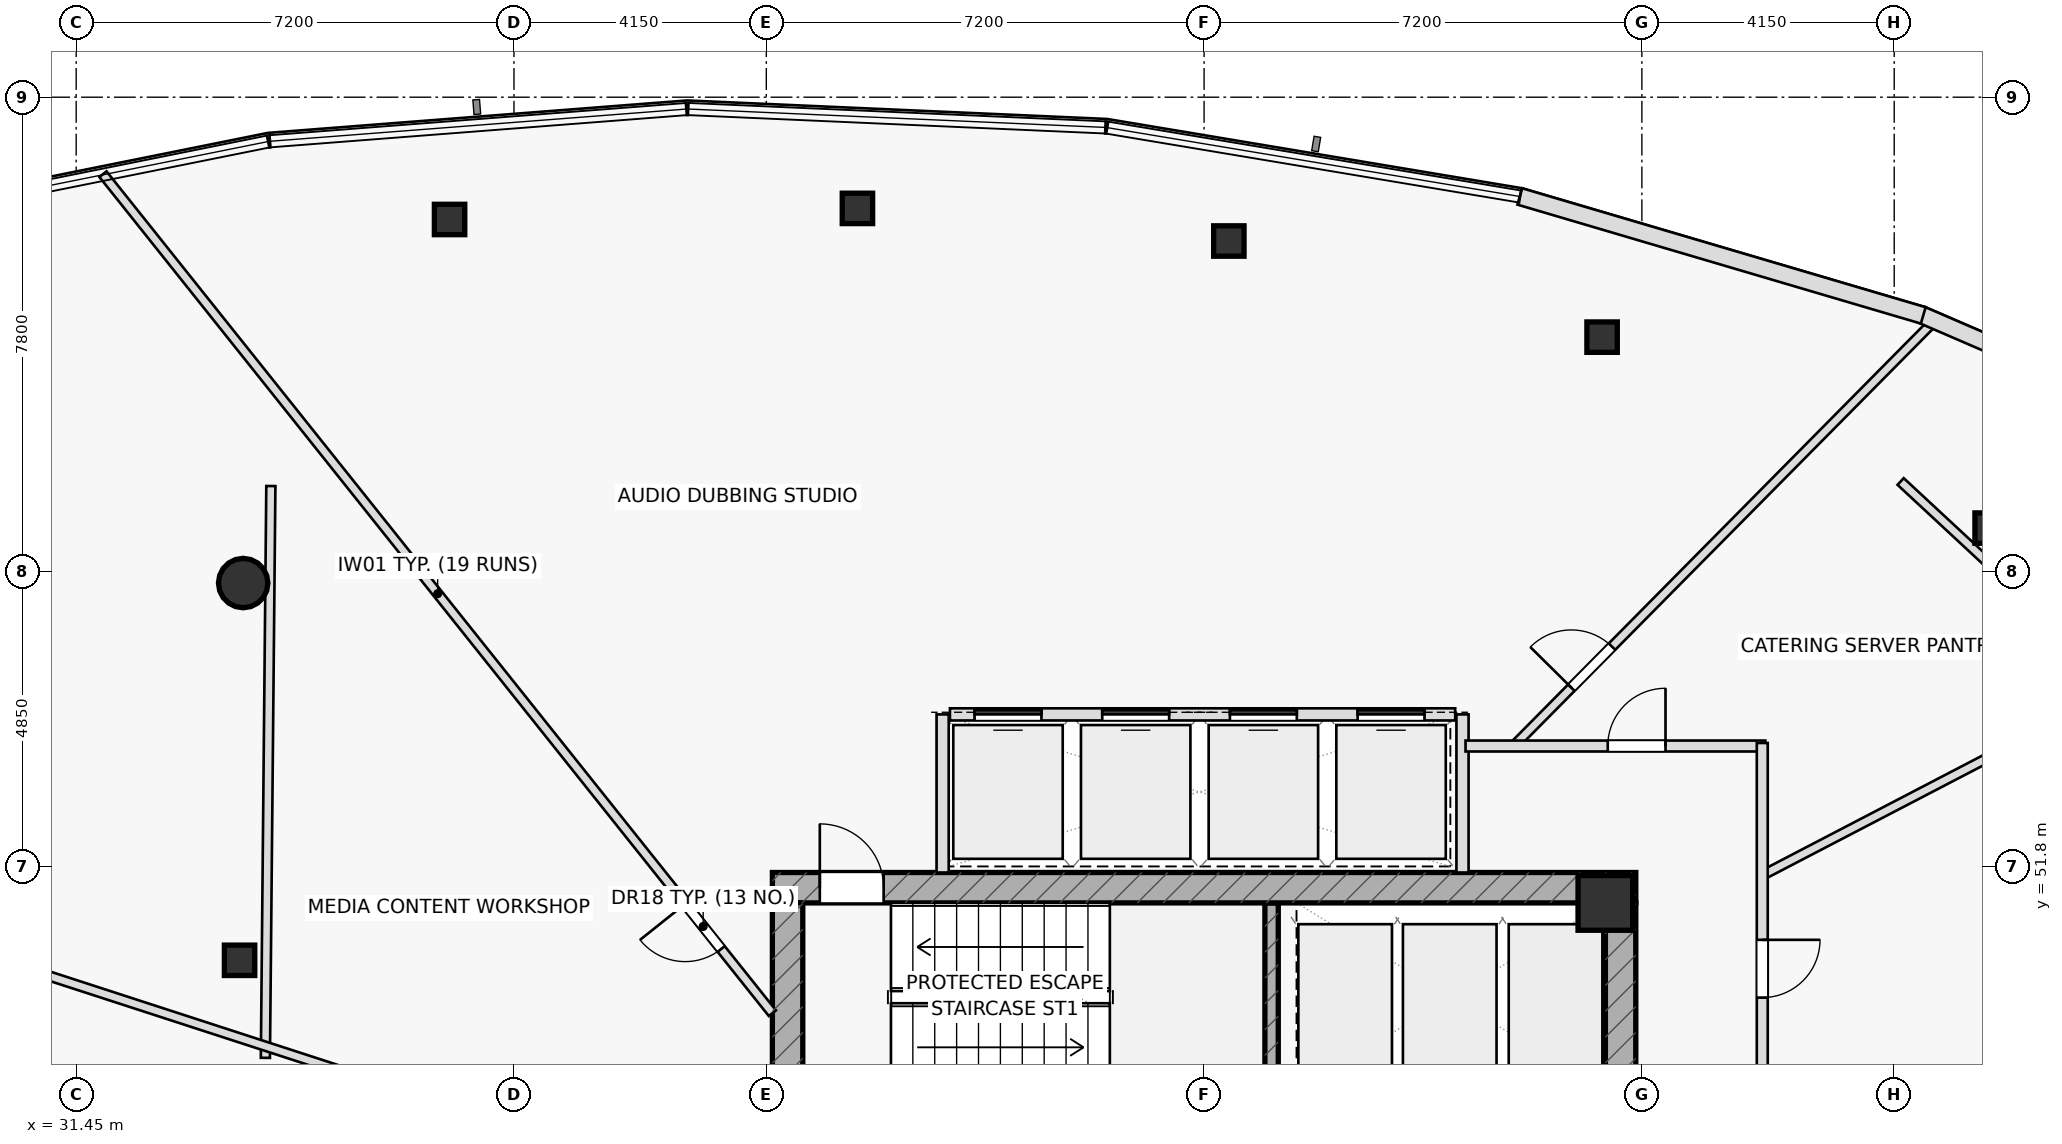
"""IFC4 building model, lengths in metres.
Left out: names, types, materials, properties, quantities, classifications, styles, units other than length and angle.
Written with IfcOpenShell. Run it as: python <this file> out.ifc"""

import sys

from ifc_helpers import new_model, si_unit, direction, frame, frame_2d, origin, origin_2d, place, context, subcontext, project, spatial, rectangle, hollow_rectangle, hollow_circle, extrude, element, fill, save


model = new_model("IFC4")
c1 = context("Model", 3, precision=1e-05, world=origin(), true_north=direction((0.0, 1.0)))
c2 = subcontext(c1, "Body", "Model", "MODEL_VIEW")
j1 = project(units=[si_unit("LENGTHUNIT", "METRE"), si_unit("PLANEANGLEUNIT", "RADIAN")], contexts=[c1])
p1 = place(None, origin())
s1 = spatial("IfcSite", under=j1, at=p1, CompositionType="ELEMENT")
p2 = place(p1, origin())
s2 = spatial("IfcBuilding", under=s1, at=p2, CompositionType="ELEMENT")
p3 = place(p2, frame((0.0, 0.0, 269.55)))
s3 = spatial("IfcBuildingStorey", under=s2, at=p3, CompositionType="ELEMENT", Elevation=269.55)
p4 = place(p3, frame((51.11, 48.1, 0.0), z_axis=(0.0, 0.0, 1.0), x_axis=(0.0, 1.0, 0.0)))
e1 = element("IfcWall", 1, at=p4, inside=s3, PredefinedType="SHEAR", context=c2, shape_type="SweptSolid", body=[
    extrude(rectangle(XDim=3.1, YDim=0.22, at=frame_2d((1.55, 0.0))), origin(), (0.0, 0.0, 1.0), 3.5),
])
p5 = place(p3, frame((42.9, 51.45, 0.0), z_axis=(0.0, 0.0, 1.0), x_axis=(1.0, 0.0, 0.0)))
e2 = element("IfcWall", 2, at=p5, inside=s3, PredefinedType="SHEAR", context=c2, shape_type="SweptSolid", body=[
    extrude(rectangle(XDim=14.2, YDim=0.5, at=frame_2d((7.1, 0.0))), origin(), (0.0, 0.0, 1.0), 3.5),
])
p6 = place(p5, frame((0.78, 0.0, 0.0)))
e3 = element("IfcOpeningElement", 3, at=p6, cuts=e2, PredefinedType="OPENING", context=c2, shape_type="SweptSolid", body=[
    extrude(rectangle(XDim=1.05, YDim=2.2, at=frame_2d((0.525, 1.1))), frame((0.0, 0.26, 0.0), z_axis=(0.0, -1.0, 0.0), x_axis=(1.0, 0.0, 0.0)), (0.0, 0.0, 1.0), 0.52),
])
p7 = place(p3, frame((43.15, 38.8, 0.0), z_axis=(0.0, 0.0, 1.0), x_axis=(0.0, 1.0, 0.0)))
e4 = element("IfcWall", 4, at=p7, inside=s3, PredefinedType="SHEAR", context=c2, shape_type="SweptSolid", body=[
    extrude(rectangle(XDim=12.4, YDim=0.5, at=frame_2d((6.2, 0.0))), origin(), (0.0, 0.0, 1.0), 3.5),
])
p8 = place(p3, frame((56.85, 38.8, 0.0), z_axis=(0.0, 0.0, 1.0), x_axis=(0.0, 1.0, 0.0)))
e5 = element("IfcWall", 5, at=p8, inside=s3, PredefinedType="SHEAR", context=c2, shape_type="SweptSolid", body=[
    extrude(rectangle(XDim=12.4, YDim=0.5, at=frame_2d((6.2, 0.0))), origin(), (0.0, 0.0, 1.0), 3.5),
])
p9 = place(p8, frame((3.85, 0.0, 0.0)))
e6 = element("IfcOpeningElement", 6, at=p9, cuts=e5, PredefinedType="OPENING", context=c2, shape_type="SweptSolid", body=[
    extrude(rectangle(XDim=1.5, YDim=2.2, at=frame_2d((0.75, 1.1))), frame((0.0, 0.26, 0.0), z_axis=(0.0, -1.0, 0.0), x_axis=(1.0, 0.0, 0.0)), (0.0, 0.0, 1.0), 0.52),
])
p10 = place(p3, frame((56.6, 51.2, 0.0), z_axis=(0.0, 0.0, 1.0), x_axis=(1.0, 0.0, 0.0)))
e7 = element("IfcColumn", 7, at=p10, inside=s3, PredefinedType="COLUMN", context=c2, shape_type="SweptSolid", body=[
    extrude(rectangle(XDim=0.9, YDim=0.9, at=origin_2d()), origin(), (0.0, 0.0, 1.0), 3.5),
])
p11 = place(p3, frame((34.196, 56.46, 0.0), z_axis=(0.0, 0.0, 1.0), x_axis=(1.0, 0.0, 0.0)))
e8 = element("IfcColumn", 8, at=p11, inside=s3, PredefinedType="COLUMN", context=c2, shape_type="SweptSolid", body=[
    extrude(hollow_circle(Radius=0.406, WallThickness=0.036, at=origin_2d()), origin(), (0.0, 0.0, 1.0), 3.5),
])
for number, where, z_axis, x_axis in (
    (9, (34.137, 50.256, 0.0), (0.0, 0.0, 1.0), (1.0, 0.0, 0.0)),
    (10, (62.927, 57.364, 0.0), (0.0, 0.0, 1.0), (1.0, 0.0, 0.0)),
    (11, (56.546, 60.504, 0.0), (0.0, 0.0, 1.0), (1.0, 0.0, 0.0)),
    (12, (50.407, 62.085, 0.0), (0.0, 0.0, 1.0), (1.0, 0.0, 0.0)),
    (13, (44.299, 62.621, 0.0), (0.0, 0.0, 1.0), (1.0, 0.0, 0.0)),
    (14, (37.591, 62.439, 0.0), (0.0, 0.0, 1.0), (1.0, 0.0, 0.0)),
):
    element("IfcColumn", number, at=place(p3, frame(where, z_axis=z_axis, x_axis=x_axis)), inside=s3, PredefinedType="COLUMN", context=c2, shape_type="SweptSolid", body=[
        extrude(hollow_rectangle(XDim=0.5, YDim=0.5, WallThickness=0.03, at=origin_2d()), origin(), (0.0, 0.0, 1.0), 3.5),
    ])
for number, where, z_axis, x_axis in (
    (15, (45.7, 51.7, 0.0), (0.0, 0.0, 1.0), (0.0, 1.0, 0.0)),
    (16, (54.25, 51.7, 0.0), (0.0, 0.0, 1.0), (0.0, 1.0, 0.0)),
):
    element("IfcWall", number, at=place(p3, frame(where, z_axis=z_axis, x_axis=x_axis)), inside=s3, PredefinedType="PARTITIONING", context=c2, shape_type="SweptSolid", body=[
        extrude(rectangle(XDim=2.6, YDim=0.2, at=frame_2d((1.3, 0.0))), origin(), (0.0, 0.0, 1.0), 3.5),
    ])
p12 = place(p3, frame((34.652, 58.056, 0.0), z_axis=(0.0, 0.0, 1.0), x_axis=(-0.009553538759, -0.999954363907, 0.0)))
e17 = element("IfcWall", 17, at=p12, inside=s3, PredefinedType="PARTITIONING", context=c2, shape_type="SweptSolid", body=[
    extrude(rectangle(XDim=9.404, YDim=0.15, at=frame_2d((4.702, 0.0))), origin(), (0.0, 0.0, 1.0), 2.195),
])
p13 = place(p3, frame((69.792, 50.388, 0.0), z_axis=(0.0, 0.0, 1.0), x_axis=(-0.732769799181, 0.680476613418, 0.0)))
e18 = element("IfcWall", 18, at=p13, inside=s3, PredefinedType="PARTITIONING", context=c2, shape_type="SweptSolid", body=[
    extrude(rectangle(XDim=11.378, YDim=0.15, at=frame_2d((5.689, 0.0))), origin(), (0.0, 0.0, 1.0), 2.195),
])
p14 = place(p3, frame((42.9, 49.386, 0.0), z_axis=(0.0, 0.0, 1.0), x_axis=(-0.623701083896, 0.781662943951, 0.0)))
e19 = element("IfcWall", 19, at=p14, inside=s3, PredefinedType="PARTITIONING", context=c2, shape_type="SweptSolid", body=[
    extrude(rectangle(XDim=17.652, YDim=0.15, at=frame_2d((8.826, 0.0))), origin(), (0.0, 0.0, 1.0), 2.195),
])
p15 = place(p14, frame((1.35, 0.0, 0.0)))
e20 = element("IfcOpeningElement", 20, at=p15, cuts=e19, PredefinedType="OPENING", context=c2, shape_type="SweptSolid", body=[
    extrude(rectangle(XDim=0.95, YDim=2.05, at=frame_2d((0.475, 1.025))), frame((0.0, 0.085, 0.0), z_axis=(0.0, -1.0, 0.0), x_axis=(1.0, 0.0, 0.0)), (0.0, 0.0, 1.0), 0.17),
])
p16 = place(p3, frame((37.344, 47.94, 0.0), z_axis=(0.0, 0.0, 1.0), x_axis=(-0.951127968225, 0.308797001379, 0.0)))
e21 = element("IfcWall", 21, at=p16, inside=s3, PredefinedType="PARTITIONING", context=c2, shape_type="SweptSolid", body=[
    extrude(rectangle(XDim=13.235, YDim=0.15, at=frame_2d((6.617, 0.0))), origin(), (0.0, 0.0, 1.0), 2.195),
])
p17 = place(p3, frame((59.18, 51.654, 0.0), z_axis=(0.0, 0.0, 1.0), x_axis=(0.886985643628, 0.461796998689, 0.0)))
e22 = element("IfcWall", 22, at=p17, inside=s3, PredefinedType="PARTITIONING", context=c2, shape_type="SweptSolid", body=[
    extrude(rectangle(XDim=11.938, YDim=0.15, at=frame_2d((5.969, 0.0))), origin(), (0.0, 0.0, 1.0), 2.195),
])
p18 = place(p3, frame((55.091, 53.78, 0.0), z_axis=(0.0, 0.0, 1.0), x_axis=(0.703481300476, 0.710713767899, 0.0)))
e23 = element("IfcWall", 23, at=p18, inside=s3, PredefinedType="PARTITIONING", context=c2, shape_type="SweptSolid", body=[
    extrude(rectangle(XDim=9.857, YDim=0.15, at=frame_2d((4.928, 0.0))), origin(), (0.0, 0.0, 1.0), 2.195),
])
p19 = place(p18, frame((1.35, 0.0, 0.0)))
e24 = element("IfcOpeningElement", 24, at=p19, cuts=e23, PredefinedType="OPENING", context=c2, shape_type="SweptSolid", body=[
    extrude(rectangle(XDim=0.95, YDim=2.05, at=frame_2d((0.475, 1.025))), frame((0.0, 0.085, 0.0), z_axis=(0.0, -1.0, 0.0), x_axis=(1.0, 0.0, 0.0)), (0.0, 0.0, 1.0), 0.17),
])
p20 = place(p3, frame((54.3, 53.78, 0.0), z_axis=(0.0, 0.0, 1.0), x_axis=(1.0, 0.0, 0.0)))
e25 = element("IfcWall", 25, at=p20, inside=s3, PredefinedType="PARTITIONING", context=c2, shape_type="SweptSolid", body=[
    extrude(rectangle(XDim=4.93, YDim=0.18, at=frame_2d((2.465, 0.0))), origin(), (0.0, 0.0, 1.0), 2.195),
])
p21 = place(p20, frame((2.339, 0.0, 0.0)))
e26 = element("IfcOpeningElement", 26, at=p21, cuts=e25, PredefinedType="OPENING", context=c2, shape_type="SweptSolid", body=[
    extrude(rectangle(XDim=0.95, YDim=2.05, at=frame_2d((0.475, 1.025))), frame((0.0, 0.1, 0.0), z_axis=(0.0, -1.0, 0.0), x_axis=(1.0, 0.0, 0.0)), (0.0, 0.0, 1.0), 0.2),
])
p22 = place(p3, frame((59.18, 53.83, 0.0), z_axis=(0.0, 0.0, 1.0), x_axis=(0.0, -1.0, 0.0)))
e27 = element("IfcWall", 27, at=p22, inside=s3, PredefinedType="PARTITIONING", context=c2, shape_type="SweptSolid", body=[
    extrude(rectangle(XDim=5.53, YDim=0.18, at=frame_2d((2.765, 0.0))), origin(), (0.0, 0.0, 1.0), 2.195),
])
p23 = place(p22, frame((3.238, 0.0, 0.0)))
e28 = element("IfcOpeningElement", 28, at=p23, cuts=e27, PredefinedType="OPENING", context=c2, shape_type="SweptSolid", body=[
    extrude(rectangle(XDim=0.95, YDim=2.05, at=frame_2d((0.475, 1.025))), frame((0.0, 0.1, 0.0), z_axis=(0.0, -1.0, 0.0), x_axis=(1.0, 0.0, 0.0)), (0.0, 0.0, 1.0), 0.2),
])
p24 = place(p3, frame((68.16, 58.122, 0.0), z_axis=(0.0, 0.0, 1.0), x_axis=(-0.917910450848, 0.396787605936, 0.0)))
e29 = element("IfcWall", 29, at=p24, inside=s3, PredefinedType="STANDARD", context=c2, shape_type="SweptSolid", body=[
    extrude(rectangle(XDim=6.929, YDim=0.28, at=frame_2d((3.465, 0.0))), origin(), (0.0, 0.0, 1.0), 3.5),
])
p25 = place(p3, frame((61.828, 60.862, 0.0), z_axis=(0.0, 0.0, 1.0), x_axis=(-0.959198421643, 0.282733775693, 0.0)))
e30 = element("IfcWall", 30, at=p25, inside=s3, PredefinedType="STANDARD", context=c2, shape_type="SweptSolid", body=[
    extrude(rectangle(XDim=6.917, YDim=0.28, at=frame_2d((3.459, 0.0))), origin(), (0.0, 0.0, 1.0), 3.5),
])
p26 = place(p3, frame((45.82, 54.3, 0.0), z_axis=(0.0, 0.0, 1.0), x_axis=(1.0, 0.0, 0.0)))
e31 = element("IfcWall", 31, at=p26, inside=s3, PredefinedType="PARTITIONING", context=c2, shape_type="SweptSolid", body=[
    extrude(rectangle(XDim=8.31, YDim=0.2, at=frame_2d((4.155, 0.0))), origin(), (0.0, 0.0, 1.0), 3.5),
])
p27 = place(p26, frame((0.405, 0.0, 0.0)))
e32 = element("IfcOpeningElement", 32, at=p27, cuts=e31, PredefinedType="OPENING", context=c2, shape_type="SweptSolid", body=[
    extrude(rectangle(XDim=1.1, YDim=2.15, at=frame_2d((0.55, 1.075))), frame((0.0, 0.11, 0.0), z_axis=(0.0, -1.0, 0.0), x_axis=(1.0, 0.0, 0.0)), (0.0, 0.0, 1.0), 0.22),
])
p28 = place(p26, frame((2.505, 0.0, 0.0)))
e33 = element("IfcOpeningElement", 33, at=p28, cuts=e31, PredefinedType="OPENING", context=c2, shape_type="SweptSolid", body=[
    extrude(rectangle(XDim=1.1, YDim=2.15, at=frame_2d((0.55, 1.075))), frame((0.0, 0.11, 0.0), z_axis=(0.0, -1.0, 0.0), x_axis=(1.0, 0.0, 0.0)), (0.0, 0.0, 1.0), 0.22),
])
p29 = place(p26, frame((4.605, 0.0, 0.0)))
e34 = element("IfcOpeningElement", 34, at=p29, cuts=e31, PredefinedType="OPENING", context=c2, shape_type="SweptSolid", body=[
    extrude(rectangle(XDim=1.1, YDim=2.15, at=frame_2d((0.55, 1.075))), frame((0.0, 0.11, 0.0), z_axis=(0.0, -1.0, 0.0), x_axis=(1.0, 0.0, 0.0)), (0.0, 0.0, 1.0), 0.22),
])
p30 = place(p26, frame((6.705, 0.0, 0.0)))
e35 = element("IfcOpeningElement", 35, at=p30, cuts=e31, PredefinedType="OPENING", context=c2, shape_type="SweptSolid", body=[
    extrude(rectangle(XDim=1.1, YDim=2.15, at=frame_2d((0.55, 1.075))), frame((0.0, 0.11, 0.0), z_axis=(0.0, -1.0, 0.0), x_axis=(1.0, 0.0, 0.0)), (0.0, 0.0, 1.0), 0.22),
])
p31 = place(p6, origin())
e36 = element("IfcDoor", 36, at=p31, inside=s3, OperationType="SINGLE_SWING_LEFT", PredefinedType="DOOR", context=c2, shape_type="SweptSolid", body=[
    extrude(rectangle(XDim=1.05, YDim=2.2, at=frame_2d((0.525, 1.1))), frame((0.0, 0.025, 0.0), z_axis=(0.0, -1.0, 0.0), x_axis=(1.0, 0.0, 0.0)), (0.0, 0.0, 1.0), 0.05),
])
fill(e3, e36)
p32 = place(p15, origin())
e37 = element("IfcDoor", 37, at=p32, inside=s3, OperationType="SINGLE_SWING_RIGHT", PredefinedType="DOOR", context=c2, shape_type="SweptSolid", body=[
    extrude(rectangle(XDim=0.95, YDim=2.05, at=frame_2d((0.475, 1.025))), frame((0.0, 0.025, 0.0), z_axis=(0.0, -1.0, 0.0), x_axis=(1.0, 0.0, 0.0)), (0.0, 0.0, 1.0), 0.05),
])
fill(e20, e37)
p33 = place(p19, origin())
e38 = element("IfcDoor", 38, at=p33, inside=s3, OperationType="SINGLE_SWING_LEFT", PredefinedType="DOOR", context=c2, shape_type="SweptSolid", body=[
    extrude(rectangle(XDim=0.95, YDim=2.05, at=frame_2d((0.475, 1.025))), frame((0.0, 0.025, 0.0), z_axis=(0.0, -1.0, 0.0), x_axis=(1.0, 0.0, 0.0)), (0.0, 0.0, 1.0), 0.05),
])
fill(e24, e38)
p34 = place(p21, origin())
e39 = element("IfcDoor", 39, at=p34, inside=s3, OperationType="SINGLE_SWING_RIGHT", PredefinedType="DOOR", context=c2, shape_type="SweptSolid", body=[
    extrude(rectangle(XDim=0.95, YDim=2.05, at=frame_2d((0.475, 1.025))), frame((0.0, 0.025, 0.0), z_axis=(0.0, -1.0, 0.0), x_axis=(1.0, 0.0, 0.0)), (0.0, 0.0, 1.0), 0.05),
])
fill(e26, e39)
p35 = place(p23, origin())
e40 = element("IfcDoor", 40, at=p35, inside=s3, OperationType="SINGLE_SWING_LEFT", PredefinedType="DOOR", context=c2, shape_type="SweptSolid", body=[
    extrude(rectangle(XDim=0.95, YDim=2.05, at=frame_2d((0.475, 1.025))), frame((0.0, 0.025, 0.0), z_axis=(0.0, -1.0, 0.0), x_axis=(1.0, 0.0, 0.0)), (0.0, 0.0, 1.0), 0.05),
])
fill(e28, e40)
p36 = place(p27, origin())
e41 = element("IfcDoor", 41, at=p36, inside=s3, OperationType="SLIDING_TO_LEFT", PredefinedType="DOOR", context=c2, shape_type="SweptSolid", body=[
    extrude(rectangle(XDim=1.1, YDim=2.15, at=frame_2d((0.55, 1.075))), frame((0.0, 0.025, 0.0), z_axis=(0.0, -1.0, 0.0), x_axis=(1.0, 0.0, 0.0)), (0.0, 0.0, 1.0), 0.05),
])
fill(e32, e41)
p37 = place(p28, origin())
e42 = element("IfcDoor", 42, at=p37, inside=s3, OperationType="SLIDING_TO_RIGHT", PredefinedType="DOOR", context=c2, shape_type="SweptSolid", body=[
    extrude(rectangle(XDim=1.1, YDim=2.15, at=frame_2d((0.55, 1.075))), frame((0.0, 0.025, 0.0), z_axis=(0.0, -1.0, 0.0), x_axis=(1.0, 0.0, 0.0)), (0.0, 0.0, 1.0), 0.05),
])
fill(e33, e42)
p38 = place(p29, origin())
e43 = element("IfcDoor", 43, at=p38, inside=s3, OperationType="SLIDING_TO_LEFT", PredefinedType="DOOR", context=c2, shape_type="SweptSolid", body=[
    extrude(rectangle(XDim=1.1, YDim=2.15, at=frame_2d((0.55, 1.075))), frame((0.0, 0.025, 0.0), z_axis=(0.0, -1.0, 0.0), x_axis=(1.0, 0.0, 0.0)), (0.0, 0.0, 1.0), 0.05),
])
fill(e34, e43)
p39 = place(p30, origin())
e44 = element("IfcDoor", 44, at=p39, inside=s3, OperationType="SLIDING_TO_RIGHT", PredefinedType="DOOR", context=c2, shape_type="SweptSolid", body=[
    extrude(rectangle(XDim=1.1, YDim=2.15, at=frame_2d((0.55, 1.075))), frame((0.0, 0.025, 0.0), z_axis=(0.0, -1.0, 0.0), x_axis=(1.0, 0.0, 0.0)), (0.0, 0.0, 1.0), 0.05),
])
fill(e35, e44)
save(model, sys.argv[1])
